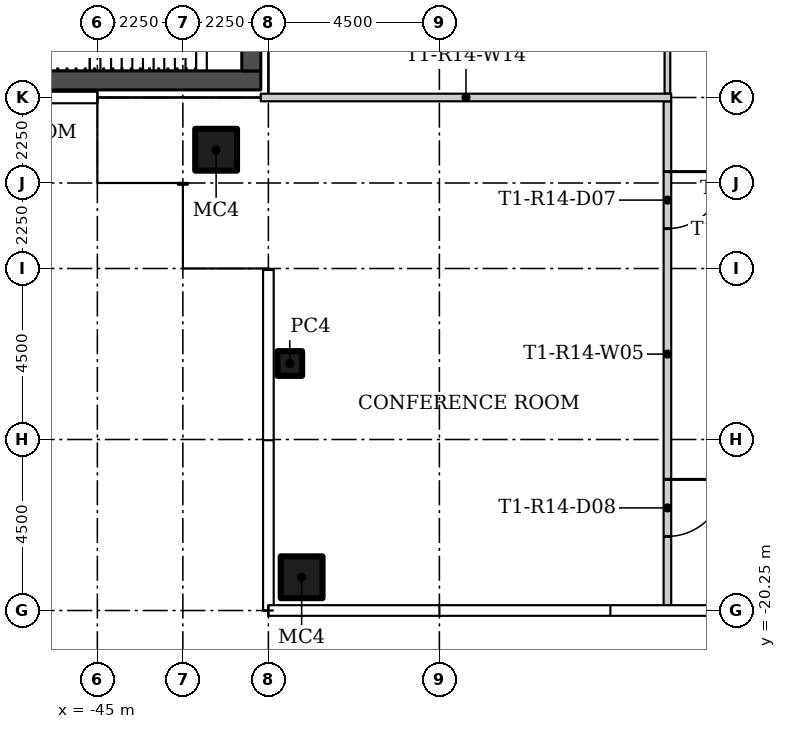
"""IFC4 building model, lengths in metres.
Left out: names, types, materials, properties, quantities, classifications, styles, units other than length and angle.
Written with IfcOpenShell. Run it as: python <this file> out.ifc"""

import sys

from ifc_helpers import new_model, si_unit, direction, frame, frame_2d, origin, origin_2d, place, context, subcontext, project, spatial, rectangle, hollow_rectangle, extrude, element, fill, save


model = new_model("IFC4")
c1 = context("Model", 3, precision=1e-05, world=origin(), true_north=direction((0.0, 1.0)))
c2 = subcontext(c1, "Body", "Model", "MODEL_VIEW")
j1 = project(units=[si_unit("LENGTHUNIT", "METRE"), si_unit("PLANEANGLEUNIT", "RADIAN")], contexts=[c1])
p1 = place(None, origin())
s1 = spatial("IfcSite", under=j1, at=p1, CompositionType="ELEMENT")
p2 = place(p1, origin())
s2 = spatial("IfcBuilding", under=s1, at=p2, CompositionType="ELEMENT")
p3 = place(p2, frame((0.0, 0.0, 138.9)))
s3 = spatial("IfcBuildingStorey", under=s2, at=p3, CompositionType="ELEMENT", Elevation=138.9)
p4 = place(p3, frame((-41.875, -8.125, 0.0)))
e1 = element("IfcColumn", 1, at=p4, inside=s3, PredefinedType="COLUMN", context=c2, shape_type="SweptSolid", body=[
    extrude(hollow_rectangle(XDim=1.1, YDim=1.1, WallThickness=0.04, at=origin_2d()), origin(), (0.0, 0.0, 1.0), 3.55),
])
p5 = place(p3, frame((-39.938, -13.75, 0.0)))
e2 = element("IfcColumn", 2, at=p5, inside=s3, PredefinedType="COLUMN", context=c2, shape_type="SweptSolid", body=[
    extrude(hollow_rectangle(XDim=0.65, YDim=0.65, WallThickness=0.02, at=origin_2d()), origin(), (0.0, 0.0, 1.0), 3.55),
])
p6 = place(p3, frame((-39.625, -19.375, 0.0)))
e3 = element("IfcColumn", 3, at=p6, inside=s3, PredefinedType="COLUMN", context=c2, shape_type="SweptSolid", body=[
    extrude(hollow_rectangle(XDim=1.1, YDim=1.1, WallThickness=0.04, at=origin_2d()), origin(), (0.0, 0.0, 1.0), 3.55),
])
p7 = place(p3, frame((-30.0, -6.85, 0.0), z_axis=(0.0, 0.0, 1.0), x_axis=(0.0, -1.0, 0.0)))
e4 = element("IfcWall", 4, at=p7, inside=s3, PredefinedType="PARTITIONING", context=c2, shape_type="SweptSolid", body=[
    extrude(rectangle(XDim=13.305, YDim=0.2, at=frame_2d((6.652, 0.0))), origin(), (0.0, 0.0, 1.0), 3.55),
])
p8 = place(p7, frame((1.85, 0.0, 0.0)))
e5 = element("IfcOpeningElement", 5, at=p8, cuts=e4, PredefinedType="OPENING", context=c2, shape_type="SweptSolid", body=[
    extrude(rectangle(XDim=1.5, YDim=2.4, at=frame_2d((0.75, 1.2))), frame((0.0, 0.11, 0.0), z_axis=(0.0, -1.0, 0.0), x_axis=(1.0, 0.0, 0.0)), (0.0, 0.0, 1.0), 0.22),
])
p9 = place(p7, frame((9.95, 0.0, 0.0)))
e6 = element("IfcOpeningElement", 6, at=p9, cuts=e4, PredefinedType="OPENING", context=c2, shape_type="SweptSolid", body=[
    extrude(rectangle(XDim=1.5, YDim=2.4, at=frame_2d((0.75, 1.2))), frame((0.0, 0.11, 0.0), z_axis=(0.0, -1.0, 0.0), x_axis=(1.0, 0.0, 0.0)), (0.0, 0.0, 1.0), 0.22),
])
p10 = place(p3, frame((-30.0, -6.65, 0.0), z_axis=(0.0, 0.0, 1.0), x_axis=(0.0, 1.0, 0.0)))
e7 = element("IfcWall", 7, at=p10, inside=s3, PredefinedType="PARTITIONING", context=c2, shape_type="SweptSolid", body=[
    extrude(rectangle(XDim=6.625, YDim=0.15, at=frame_2d((3.312, 0.0))), origin(), (0.0, 0.0, 1.0), 3.55),
])
p11 = place(p3, frame((-29.9, -6.75, 0.0), z_axis=(0.0, 0.0, 1.0), x_axis=(-1.0, 0.0, 0.0)))
e8 = element("IfcWall", 8, at=p11, inside=s3, PredefinedType="PARTITIONING", context=c2, shape_type="SweptSolid", body=[
    extrude(rectangle(XDim=10.8, YDim=0.2, at=frame_2d((5.4, 0.0))), origin(), (0.0, 0.0, 1.0), 3.55),
])
p12 = place(p3, frame((-40.7, -6.3, 0.0), z_axis=(0.0, 0.0, 1.0), x_axis=(-1.0, 0.0, 0.0)))
e9 = element("IfcWall", 9, at=p12, inside=s3, PredefinedType="SHEAR", context=c2, shape_type="SweptSolid", body=[
    extrude(rectangle(XDim=13.1, YDim=0.5, at=frame_2d((6.55, 0.0))), origin(), (0.0, 0.0, 1.0), 3.55),
])
p13 = place(p3, frame((-40.95, -6.05, 0.0), z_axis=(0.0, 0.0, 1.0), x_axis=(0.0, 1.0, 0.0)))
e10 = element("IfcWall", 10, at=p13, inside=s3, PredefinedType="SHEAR", context=c2, shape_type="SweptSolid", body=[
    extrude(rectangle(XDim=12.1, YDim=0.5, at=frame_2d((6.05, 0.0))), origin(), (0.0, 0.0, 1.0), 3.55),
])
p14 = place(p13, frame((6.4, 0.0, 0.0)))
e11 = element("IfcOpeningElement", 11, at=p14, cuts=e10, PredefinedType="OPENING", context=c2, shape_type="SweptSolid", body=[
    extrude(rectangle(XDim=1.8, YDim=2.4, at=frame_2d((0.9, 1.2))), frame((0.0, 0.26, 0.0), z_axis=(0.0, -1.0, 0.0), x_axis=(1.0, 0.0, 0.0)), (0.0, 0.0, 1.0), 0.52),
])
p15 = place(p8, origin())
e12 = element("IfcDoor", 12, at=p15, inside=s3, OperationType="DOUBLE_DOOR_SINGLE_SWING", PredefinedType="DOOR", context=c2, shape_type="SweptSolid", body=[
    extrude(rectangle(XDim=1.5, YDim=2.4, at=frame_2d((0.75, 1.2))), frame((0.0, 0.025, 0.0), z_axis=(0.0, -1.0, 0.0), x_axis=(1.0, 0.0, 0.0)), (0.0, 0.0, 1.0), 0.05),
])
fill(e5, e12)
p16 = place(p9, origin())
e13 = element("IfcDoor", 13, at=p16, inside=s3, OperationType="DOUBLE_DOOR_SINGLE_SWING", PredefinedType="DOOR", context=c2, shape_type="SweptSolid", body=[
    extrude(rectangle(XDim=1.5, YDim=2.4, at=frame_2d((0.75, 1.2))), frame((0.0, 0.025, 0.0), z_axis=(0.0, -1.0, 0.0), x_axis=(1.0, 0.0, 0.0)), (0.0, 0.0, 1.0), 0.05),
])
fill(e6, e13)
save(model, sys.argv[1])
